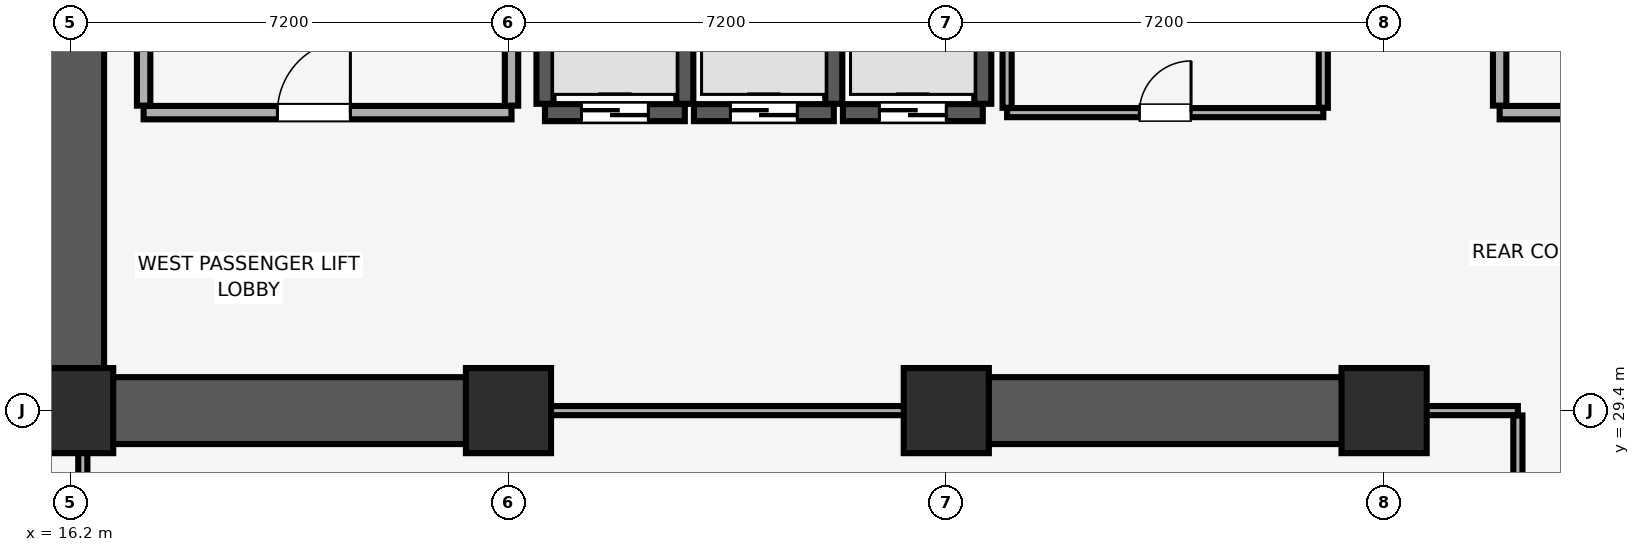
"""IFC4 building model, lengths in metres.
Left out: names, types, materials, properties, quantities, classifications, styles, units other than length and angle.
Written with IfcOpenShell. Run it as: python <this file> out.ifc"""

import sys

from ifc_helpers import new_model, si_unit, direction, frame, frame_2d, origin, origin_2d, place, context, subcontext, project, spatial, rectangle, extrude, element, fill, save


model = new_model("IFC4")
c1 = context("Model", 3, precision=1e-05, world=origin(), true_north=direction((0.0, 1.0)))
c2 = subcontext(c1, "Body", "Model", "MODEL_VIEW")
j1 = project(units=[si_unit("LENGTHUNIT", "METRE"), si_unit("PLANEANGLEUNIT", "RADIAN")], contexts=[c1])
p1 = place(None, origin())
s1 = spatial("IfcSite", under=j1, at=p1, CompositionType="ELEMENT")
p2 = place(p1, origin())
s2 = spatial("IfcBuilding", under=s1, at=p2, CompositionType="ELEMENT")
p3 = place(p2, frame((0.0, 0.0, 19.4)))
s3 = spatial("IfcBuildingStorey", under=s2, at=p3, CompositionType="ELEMENT", Elevation=19.4)
for number, where, z_axis, x_axis in (
    (1, (16.2, 29.4, 0.0), (0.0, 0.0, 1.0), (1.0, 0.0, 0.0)),
    (2, (23.4, 29.4, 0.0), (0.0, 0.0, 1.0), (1.0, 0.0, 0.0)),
    (3, (30.6, 29.4, 0.0), (0.0, 0.0, 1.0), (1.0, 0.0, 0.0)),
    (4, (37.8, 29.4, 0.0), (0.0, 0.0, 1.0), (1.0, 0.0, 0.0)),
):
    element("IfcColumn", number, at=place(p3, frame(where, z_axis=z_axis, x_axis=x_axis)), inside=s3, PredefinedType="COLUMN", context=c2, shape_type="SweptSolid", body=[
        extrude(rectangle(XDim=1.4, YDim=1.4, at=origin_2d()), origin(), (0.0, 0.0, 1.0), 6.28),
    ])
p4 = place(p3, frame((16.2, 29.4, 0.0), z_axis=(0.0, 0.0, 1.0), x_axis=(0.0, 1.0, 0.0)))
e5 = element("IfcWall", 5, at=p4, inside=s3, PredefinedType="SHEAR", context=c2, shape_type="SweptSolid", body=[
    extrude(rectangle(XDim=19.2, YDim=1.1, at=frame_2d((9.6, 0.0))), origin(), (0.0, 0.0, 1.0), 6.28),
])
p5 = place(p3, frame((16.755, 29.4, 0.0), z_axis=(0.0, 0.0, 1.0), x_axis=(1.0, 0.0, 0.0)))
e6 = element("IfcWall", 6, at=p5, inside=s3, PredefinedType="SHEAR", context=c2, shape_type="SweptSolid", body=[
    extrude(rectangle(XDim=6.845, YDim=1.1, at=frame_2d((3.423, 0.0))), origin(), (0.0, 0.0, 1.0), 6.28),
])
p6 = place(p3, frame((30.4, 29.4, 0.0), z_axis=(0.0, 0.0, 1.0), x_axis=(1.0, 0.0, 0.0)))
e7 = element("IfcWall", 7, at=p6, inside=s3, PredefinedType="SHEAR", context=c2, shape_type="SweptSolid", body=[
    extrude(rectangle(XDim=7.6, YDim=1.1, at=frame_2d((3.8, 0.0))), origin(), (0.0, 0.0, 1.0), 6.28),
])
p7 = place(p3, frame((24.0, 34.3, 0.0), z_axis=(0.0, 0.0, 1.0), x_axis=(1.0, 0.0, 0.0)))
e8 = element("IfcWall", 8, at=p7, inside=s3, PredefinedType="SHEAR", context=c2, shape_type="SweptSolid", body=[
    extrude(rectangle(XDim=2.3, YDim=0.28, at=frame_2d((1.15, 0.0))), origin(), (0.0, 0.0, 1.0), 6.28),
])
p8 = place(p7, frame((0.6, 0.0, 0.0)))
e9 = element("IfcOpeningElement", 9, at=p8, cuts=e8, PredefinedType="OPENING", context=c2, shape_type="SweptSolid", body=[
    extrude(rectangle(XDim=1.1, YDim=2.2, at=frame_2d((0.55, 1.1))), frame((0.0, 0.15, 0.0), z_axis=(0.0, -1.0, 0.0), x_axis=(1.0, 0.0, 0.0)), (0.0, 0.0, 1.0), 0.3),
])
for number, where, z_axis, x_axis in (
    (10, (24.0, 34.445, 0.0), (0.0, 0.0, 1.0), (0.0, 1.0, 0.0)),
    (11, (26.3, 34.445, 0.0), (0.0, 0.0, 1.0), (0.0, 1.0, 0.0)),
):
    element("IfcWall", number, at=place(p3, frame(where, z_axis=z_axis, x_axis=x_axis)), inside=s3, PredefinedType="SHEAR", context=c2, shape_type="SweptSolid", body=[
        extrude(rectangle(XDim=2.01, YDim=0.28, at=frame_2d((1.005, 0.0))), origin(), (0.0, 0.0, 1.0), 6.28),
    ])
p9 = place(p3, frame((26.45, 34.3, 0.0), z_axis=(0.0, 0.0, 1.0), x_axis=(1.0, 0.0, 0.0)))
e12 = element("IfcWall", 12, at=p9, inside=s3, PredefinedType="SHEAR", context=c2, shape_type="SweptSolid", body=[
    extrude(rectangle(XDim=2.3, YDim=0.28, at=frame_2d((1.15, 0.0))), origin(), (0.0, 0.0, 1.0), 6.28),
])
p10 = place(p9, frame((0.6, 0.0, 0.0)))
e13 = element("IfcOpeningElement", 13, at=p10, cuts=e12, PredefinedType="OPENING", context=c2, shape_type="SweptSolid", body=[
    extrude(rectangle(XDim=1.1, YDim=2.2, at=frame_2d((0.55, 1.1))), frame((0.0, 0.15, 0.0), z_axis=(0.0, -1.0, 0.0), x_axis=(1.0, 0.0, 0.0)), (0.0, 0.0, 1.0), 0.3),
])
p11 = place(p3, frame((28.75, 34.445, 0.0), z_axis=(0.0, 0.0, 1.0), x_axis=(0.0, 1.0, 0.0)))
e14 = element("IfcWall", 14, at=p11, inside=s3, PredefinedType="SHEAR", context=c2, shape_type="SweptSolid", body=[
    extrude(rectangle(XDim=2.01, YDim=0.28, at=frame_2d((1.005, 0.0))), origin(), (0.0, 0.0, 1.0), 6.28),
])
p12 = place(p3, frame((28.9, 34.3, 0.0), z_axis=(0.0, 0.0, 1.0), x_axis=(1.0, 0.0, 0.0)))
e15 = element("IfcWall", 15, at=p12, inside=s3, PredefinedType="SHEAR", context=c2, shape_type="SweptSolid", body=[
    extrude(rectangle(XDim=2.3, YDim=0.28, at=frame_2d((1.15, 0.0))), origin(), (0.0, 0.0, 1.0), 6.28),
])
p13 = place(p12, frame((0.6, 0.0, 0.0)))
e16 = element("IfcOpeningElement", 16, at=p13, cuts=e15, PredefinedType="OPENING", context=c2, shape_type="SweptSolid", body=[
    extrude(rectangle(XDim=1.1, YDim=2.2, at=frame_2d((0.55, 1.1))), frame((0.0, 0.15, 0.0), z_axis=(0.0, -1.0, 0.0), x_axis=(1.0, 0.0, 0.0)), (0.0, 0.0, 1.0), 0.3),
])
p14 = place(p3, frame((31.2, 34.445, 0.0), z_axis=(0.0, 0.0, 1.0), x_axis=(0.0, 1.0, 0.0)))
e17 = element("IfcWall", 17, at=p14, inside=s3, PredefinedType="SHEAR", context=c2, shape_type="SweptSolid", body=[
    extrude(rectangle(XDim=2.01, YDim=0.28, at=frame_2d((1.005, 0.0))), origin(), (0.0, 0.0, 1.0), 6.28),
])
p15 = place(p3, frame((17.4, 34.3, 0.0), z_axis=(0.0, 0.0, 1.0), x_axis=(1.0, 0.0, 0.0)))
e18 = element("IfcWall", 18, at=p15, inside=s3, PredefinedType="PARTITIONING", context=c2, shape_type="SweptSolid", body=[
    extrude(rectangle(XDim=6.05, YDim=0.22, at=frame_2d((3.025, 0.0))), origin(), (0.0, 0.0, 1.0), 6.28),
])
p16 = place(p15, frame((2.2, 0.0, 0.0)))
e19 = element("IfcOpeningElement", 19, at=p16, cuts=e18, PredefinedType="OPENING", context=c2, shape_type="SweptSolid", body=[
    extrude(rectangle(XDim=1.2, YDim=2.15, at=frame_2d((0.6, 1.075))), frame((0.0, 0.12, 0.0), z_axis=(0.0, -1.0, 0.0), x_axis=(1.0, 0.0, 0.0)), (0.0, 0.0, 1.0), 0.24),
])
p17 = place(p3, frame((17.4, 34.415, 0.0), z_axis=(0.0, 0.0, 1.0), x_axis=(0.0, 1.0, 0.0)))
e20 = element("IfcWall", 20, at=p17, inside=s3, PredefinedType="PARTITIONING", context=c2, shape_type="SweptSolid", body=[
    extrude(rectangle(XDim=5.43, YDim=0.22, at=frame_2d((2.715, 0.0))), origin(), (0.0, 0.0, 1.0), 6.28),
])
p18 = place(p3, frame((23.45, 34.415, 0.0), z_axis=(0.0, 0.0, 1.0), x_axis=(0.0, 1.0, 0.0)))
e21 = element("IfcWall", 21, at=p18, inside=s3, PredefinedType="PARTITIONING", context=c2, shape_type="SweptSolid", body=[
    extrude(rectangle(XDim=5.64, YDim=0.22, at=frame_2d((2.82, 0.0))), origin(), (0.0, 0.0, 1.0), 6.28),
])
p19 = place(p3, frame((39.7, 34.3, 0.0), z_axis=(0.0, 0.0, 1.0), x_axis=(1.0, 0.0, 0.0)))
e22 = element("IfcWall", 22, at=p19, inside=s3, PredefinedType="PARTITIONING", context=c2, shape_type="SweptSolid", body=[
    extrude(rectangle(XDim=4.6, YDim=0.22, at=frame_2d((2.3, 0.0))), origin(), (0.0, 0.0, 1.0), 6.28),
])
p20 = place(p19, frame((1.7, 0.0, 0.0)))
e23 = element("IfcOpeningElement", 23, at=p20, cuts=e22, PredefinedType="OPENING", context=c2, shape_type="SweptSolid", body=[
    extrude(rectangle(XDim=1.2, YDim=2.15, at=frame_2d((0.6, 1.075))), frame((0.0, 0.12, 0.0), z_axis=(0.0, -1.0, 0.0), x_axis=(1.0, 0.0, 0.0)), (0.0, 0.0, 1.0), 0.24),
])
p21 = place(p3, frame((39.7, 34.415, 0.0), z_axis=(0.0, 0.0, 1.0), x_axis=(0.0, 1.0, 0.0)))
e24 = element("IfcWall", 24, at=p21, inside=s3, PredefinedType="PARTITIONING", context=c2, shape_type="SweptSolid", body=[
    extrude(rectangle(XDim=5.785, YDim=0.22, at=frame_2d((2.893, 0.0))), origin(), (0.0, 0.0, 1.0), 6.28),
])
p22 = place(p3, frame((31.6, 34.3, 0.0), z_axis=(0.0, 0.0, 1.0), x_axis=(1.0, 0.0, 0.0)))
e25 = element("IfcWall", 25, at=p22, inside=s3, PredefinedType="PARTITIONING", context=c2, shape_type="SweptSolid", body=[
    extrude(rectangle(XDim=5.2, YDim=0.15, at=frame_2d((2.6, 0.0))), origin(), (0.0, 0.0, 1.0), 6.28),
])
p23 = place(p22, frame((2.175, 0.0, 0.0)))
e26 = element("IfcOpeningElement", 26, at=p23, cuts=e25, PredefinedType="OPENING", context=c2, shape_type="SweptSolid", body=[
    extrude(rectangle(XDim=0.85, YDim=2.1, at=frame_2d((0.425, 1.05))), frame((0.0, 0.085, 0.0), z_axis=(0.0, -1.0, 0.0), x_axis=(1.0, 0.0, 0.0)), (0.0, 0.0, 1.0), 0.17),
])
for number, where, z_axis, x_axis in (
    (27, (31.6, 34.38, 0.0), (0.0, 0.0, 1.0), (0.0, 1.0, 0.0)),
    (28, (36.8, 34.38, 0.0), (0.0, 0.0, 1.0), (0.0, 1.0, 0.0)),
):
    element("IfcWall", number, at=place(p3, frame(where, z_axis=z_axis, x_axis=x_axis)), inside=s3, PredefinedType="PARTITIONING", context=c2, shape_type="SweptSolid", body=[
        extrude(rectangle(XDim=4.94, YDim=0.15, at=frame_2d((2.47, 0.0))), origin(), (0.0, 0.0, 1.0), 6.28),
    ])
p24 = place(p3, frame((23.61, 29.4, 0.0), z_axis=(0.0, 0.0, 1.0), x_axis=(1.0, 0.0, 0.0)))
e29 = element("IfcWall", 29, at=p24, inside=s3, PredefinedType="PARTITIONING", context=c2, shape_type="SweptSolid", body=[
    extrude(rectangle(XDim=6.78, YDim=0.15, at=frame_2d((3.39, 0.0))), origin(), (0.0, 0.0, 1.0), 5.18),
])
p25 = place(p3, frame((38.01, 29.4, 0.0), z_axis=(0.0, 0.0, 1.0), x_axis=(1.0, 0.0, 0.0)))
e30 = element("IfcWall", 30, at=p25, inside=s3, PredefinedType="PARTITIONING", context=c2, shape_type="SweptSolid", body=[
    extrude(rectangle(XDim=1.99, YDim=0.15, at=frame_2d((0.995, 0.0))), origin(), (0.0, 0.0, 1.0), 5.18),
])
p26 = place(p3, frame((16.4, 25.48, 0.0), z_axis=(0.0, 0.0, 1.0), x_axis=(0.0, 1.0, 0.0)))
e31 = element("IfcWall", 31, at=p26, inside=s3, PredefinedType="PARTITIONING", context=c2, shape_type="SweptSolid", body=[
    extrude(rectangle(XDim=3.91, YDim=0.15, at=frame_2d((1.955, 0.0))), origin(), (0.0, 0.0, 1.0), 5.68),
])
p27 = place(p3, frame((40.0, 25.48, 0.0), z_axis=(0.0, 0.0, 1.0), x_axis=(0.0, 1.0, 0.0)))
e32 = element("IfcWall", 32, at=p27, inside=s3, PredefinedType="PARTITIONING", context=c2, shape_type="SweptSolid", body=[
    extrude(rectangle(XDim=3.84, YDim=0.15, at=frame_2d((1.92, 0.0))), origin(), (0.0, 0.0, 1.0), 6.28),
])
p28 = place(p8, origin())
e33 = element("IfcDoor", 33, at=p28, inside=s3, OperationType="DOUBLE_DOOR_SLIDING", PredefinedType="DOOR", context=c2, shape_type="SweptSolid", body=[
    extrude(rectangle(XDim=1.1, YDim=2.2, at=frame_2d((0.55, 1.1))), frame((0.0, 0.025, 0.0), z_axis=(0.0, -1.0, 0.0), x_axis=(1.0, 0.0, 0.0)), (0.0, 0.0, 1.0), 0.05),
])
fill(e9, e33)
p29 = place(p10, origin())
e34 = element("IfcDoor", 34, at=p29, inside=s3, OperationType="DOUBLE_DOOR_SLIDING", PredefinedType="DOOR", context=c2, shape_type="SweptSolid", body=[
    extrude(rectangle(XDim=1.1, YDim=2.2, at=frame_2d((0.55, 1.1))), frame((0.0, 0.025, 0.0), z_axis=(0.0, -1.0, 0.0), x_axis=(1.0, 0.0, 0.0)), (0.0, 0.0, 1.0), 0.05),
])
fill(e13, e34)
p30 = place(p13, origin())
e35 = element("IfcDoor", 35, at=p30, inside=s3, OperationType="DOUBLE_DOOR_SLIDING", PredefinedType="DOOR", context=c2, shape_type="SweptSolid", body=[
    extrude(rectangle(XDim=1.1, YDim=2.2, at=frame_2d((0.55, 1.1))), frame((0.0, 0.025, 0.0), z_axis=(0.0, -1.0, 0.0), x_axis=(1.0, 0.0, 0.0)), (0.0, 0.0, 1.0), 0.05),
])
fill(e16, e35)
p31 = place(p16, origin())
e36 = element("IfcDoor", 36, at=p31, inside=s3, OperationType="SINGLE_SWING_RIGHT", PredefinedType="DOOR", context=c2, shape_type="SweptSolid", body=[
    extrude(rectangle(XDim=1.2, YDim=2.15, at=frame_2d((0.6, 1.075))), frame((0.0, 0.025, 0.0), z_axis=(0.0, -1.0, 0.0), x_axis=(1.0, 0.0, 0.0)), (0.0, 0.0, 1.0), 0.05),
])
fill(e19, e36)
p32 = place(p23, origin())
e37 = element("IfcDoor", 37, at=p32, inside=s3, OperationType="SINGLE_SWING_RIGHT", PredefinedType="DOOR", context=c2, shape_type="SweptSolid", body=[
    extrude(rectangle(XDim=0.85, YDim=2.1, at=frame_2d((0.425, 1.05))), frame((0.0, 0.025, 0.0), z_axis=(0.0, -1.0, 0.0), x_axis=(1.0, 0.0, 0.0)), (0.0, 0.0, 1.0), 0.05),
])
fill(e26, e37)
save(model, sys.argv[1])
